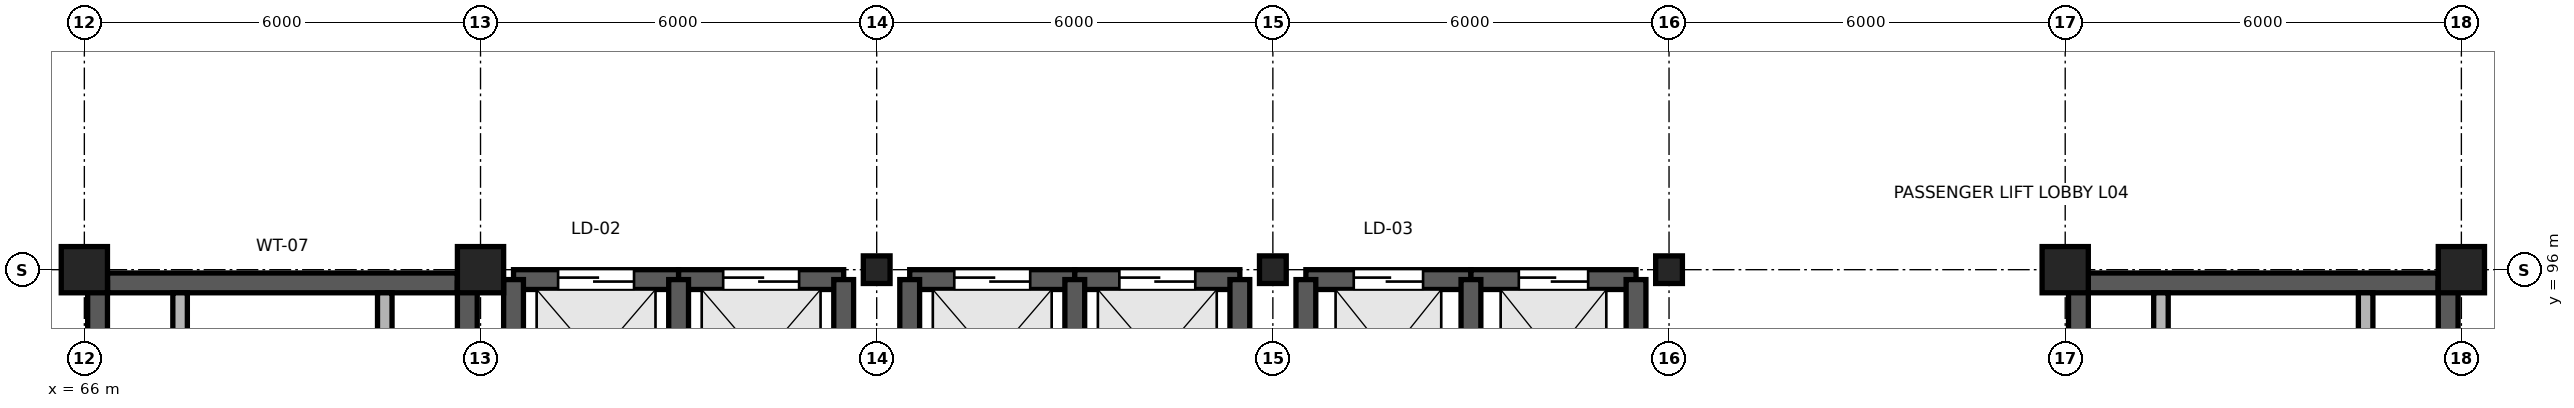
"""IFC4 building model, lengths in metres.
Left out: names, types, materials, properties, quantities, classifications, styles, units other than length and angle.
Written with IfcOpenShell. Run it as: python <this file> out.ifc"""

import sys

from ifc_helpers import new_model, si_unit, direction, frame, frame_2d, origin, origin_2d, place, context, subcontext, project, spatial, rectangle, i_section, extrude, element, fill, save


model = new_model("IFC4")
c1 = context("Model", 3, precision=1e-05, world=origin(), true_north=direction((0.0, 1.0)))
c2 = subcontext(c1, "Body", "Model", "MODEL_VIEW")
j1 = project(units=[si_unit("LENGTHUNIT", "METRE"), si_unit("PLANEANGLEUNIT", "RADIAN")], contexts=[c1])
p1 = place(None, origin())
s1 = spatial("IfcSite", under=j1, at=p1, CompositionType="ELEMENT")
p2 = place(p1, origin())
s2 = spatial("IfcBuilding", under=s1, at=p2, CompositionType="ELEMENT")
p3 = place(p2, frame((0.0, 0.0, 16.5)))
s3 = spatial("IfcBuildingStorey", under=s2, at=p3, CompositionType="ELEMENT", Elevation=16.5)
for number, where, z_axis, x_axis in (
    (1, (66.0, 96.0, 0.0), (0.0, 0.0, 1.0), (1.0, 0.0, 0.0)),
    (2, (72.0, 96.0, 0.0), (0.0, 0.0, 1.0), (1.0, 0.0, 0.0)),
):
    element("IfcColumn", number, at=place(p3, frame(where, z_axis=z_axis, x_axis=x_axis)), inside=s3, PredefinedType="COLUMN", context=c2, shape_type="SweptSolid", body=[
        extrude(rectangle(XDim=0.7, YDim=0.7, at=origin_2d()), origin(), (0.0, 0.0, 1.0), 4.5),
    ])
for number, where, z_axis, x_axis in (
    (3, (78.0, 96.0, 0.0), (0.0, 0.0, 1.0), (1.0, 0.0, 0.0)),
    (4, (84.0, 96.0, 0.0), (0.0, 0.0, 1.0), (1.0, 0.0, 0.0)),
    (5, (90.0, 96.0, 0.0), (0.0, 0.0, 1.0), (1.0, 0.0, 0.0)),
):
    element("IfcColumn", number, at=place(p3, frame(where, z_axis=z_axis, x_axis=x_axis)), inside=s3, PredefinedType="COLUMN", context=c2, shape_type="SweptSolid", body=[
        extrude(i_section(OverallWidth=0.405, OverallDepth=0.418, WebThickness=0.02, FlangeThickness=0.03, FilletRadius=0.022, at=origin_2d()), origin(), (0.0, 0.0, 1.0), 4.5),
    ])
for number, where, z_axis, x_axis in (
    (6, (96.0, 96.0, 0.0), (0.0, 0.0, 1.0), (1.0, 0.0, 0.0)),
    (7, (102.0, 96.0, 0.0), (0.0, 0.0, 1.0), (1.0, 0.0, 0.0)),
):
    element("IfcColumn", number, at=place(p3, frame(where, z_axis=z_axis, x_axis=x_axis)), inside=s3, PredefinedType="COLUMN", context=c2, shape_type="SweptSolid", body=[
        extrude(rectangle(XDim=0.7, YDim=0.7, at=origin_2d()), origin(), (0.0, 0.0, 1.0), 4.5),
    ])
p4 = place(p3, frame((66.35, 95.8, 0.0), z_axis=(0.0, 0.0, 1.0), x_axis=(1.0, 0.0, 0.0)))
e8 = element("IfcWall", 8, at=p4, inside=s3, PredefinedType="SHEAR", context=c2, shape_type="SweptSolid", body=[
    extrude(rectangle(XDim=5.3, YDim=0.3, at=frame_2d((2.65, 0.0))), origin(), (0.0, 0.0, 1.0), 4.34),
])
for number, where, z_axis, x_axis in (
    (9, (66.2, 84.0, 0.0), (0.0, 0.0, 1.0), (0.0, 1.0, 0.0)),
    (10, (71.8, 84.0, 0.0), (0.0, 0.0, 1.0), (0.0, 1.0, 0.0)),
):
    element("IfcWall", number, at=place(p3, frame(where, z_axis=z_axis, x_axis=x_axis)), inside=s3, PredefinedType="SHEAR", context=c2, shape_type="SweptSolid", body=[
        extrude(rectangle(XDim=11.8, YDim=0.3, at=frame_2d((5.9, 0.0))), origin(), (0.0, 0.0, 1.0), 4.34),
    ])
for number, where, z_axis, x_axis in (
    (11, (67.45, 94.4, 0.0), (0.0, 0.0, 1.0), (0.0, 1.0, 0.0)),
    (12, (70.55, 94.4, 0.0), (0.0, 0.0, 1.0), (0.0, 1.0, 0.0)),
):
    element("IfcWall", number, at=place(p3, frame(where, z_axis=z_axis, x_axis=x_axis)), inside=s3, PredefinedType="PARTITIONING", context=c2, shape_type="SweptSolid", body=[
        extrude(rectangle(XDim=1.25, YDim=0.22, at=frame_2d((0.625, 0.0))), origin(), (0.0, 0.0, 1.0), 4.34),
    ])
p5 = place(p3, frame((96.35, 95.8, 0.0), z_axis=(0.0, 0.0, 1.0), x_axis=(1.0, 0.0, 0.0)))
e13 = element("IfcWall", 13, at=p5, inside=s3, PredefinedType="SHEAR", context=c2, shape_type="SweptSolid", body=[
    extrude(rectangle(XDim=5.3, YDim=0.3, at=frame_2d((2.65, 0.0))), origin(), (0.0, 0.0, 1.0), 4.34),
])
for number, where, z_axis, x_axis in (
    (14, (96.2, 84.0, 0.0), (0.0, 0.0, 1.0), (0.0, 1.0, 0.0)),
    (15, (101.8, 84.0, 0.0), (0.0, 0.0, 1.0), (0.0, 1.0, 0.0)),
):
    element("IfcWall", number, at=place(p3, frame(where, z_axis=z_axis, x_axis=x_axis)), inside=s3, PredefinedType="SHEAR", context=c2, shape_type="SweptSolid", body=[
        extrude(rectangle(XDim=11.8, YDim=0.3, at=frame_2d((5.9, 0.0))), origin(), (0.0, 0.0, 1.0), 4.34),
    ])
for number, where, z_axis, x_axis in (
    (16, (97.45, 94.4, 0.0), (0.0, 0.0, 1.0), (0.0, 1.0, 0.0)),
    (17, (100.55, 94.4, 0.0), (0.0, 0.0, 1.0), (0.0, 1.0, 0.0)),
):
    element("IfcWall", number, at=place(p3, frame(where, z_axis=z_axis, x_axis=x_axis)), inside=s3, PredefinedType="PARTITIONING", context=c2, shape_type="SweptSolid", body=[
        extrude(rectangle(XDim=1.25, YDim=0.22, at=frame_2d((0.625, 0.0))), origin(), (0.0, 0.0, 1.0), 4.34),
    ])
p6 = place(p3, frame((72.5, 95.85, 0.0), z_axis=(0.0, 0.0, 1.0), x_axis=(1.0, 0.0, 0.0)))
e18 = element("IfcWall", 18, at=p6, inside=s3, PredefinedType="SHEAR", context=c2, shape_type="SweptSolid", body=[
    extrude(rectangle(XDim=2.5, YDim=0.3, at=frame_2d((1.25, 0.0))), origin(), (0.0, 0.0, 1.0), 4.34),
])
p7 = place(p6, frame((0.675, 0.0, 0.0)))
e19 = element("IfcOpeningElement", 19, at=p7, cuts=e18, PredefinedType="OPENING", context=c2, shape_type="SweptSolid", body=[
    extrude(rectangle(XDim=1.15, YDim=2.15, at=frame_2d((0.575, 1.075))), frame((0.0, 0.165, 0.0), z_axis=(0.0, -1.0, 0.0), x_axis=(1.0, 0.0, 0.0)), (0.0, 0.0, 1.0), 0.33),
])
p8 = place(p3, frame((72.5, 92.45, 0.0), z_axis=(0.0, 0.0, 1.0), x_axis=(0.0, 1.0, 0.0)))
e20 = element("IfcWall", 20, at=p8, inside=s3, PredefinedType="SHEAR", context=c2, shape_type="SweptSolid", body=[
    extrude(rectangle(XDim=3.4, YDim=0.3, at=frame_2d((1.7, 0.0))), origin(), (0.0, 0.0, 1.0), 4.34),
])
p9 = place(p3, frame((75.0, 95.85, 0.0), z_axis=(0.0, 0.0, 1.0), x_axis=(1.0, 0.0, 0.0)))
e21 = element("IfcWall", 21, at=p9, inside=s3, PredefinedType="SHEAR", context=c2, shape_type="SweptSolid", body=[
    extrude(rectangle(XDim=2.5, YDim=0.3, at=frame_2d((1.25, 0.0))), origin(), (0.0, 0.0, 1.0), 4.34),
])
p10 = place(p9, frame((0.675, 0.0, 0.0)))
e22 = element("IfcOpeningElement", 22, at=p10, cuts=e21, PredefinedType="OPENING", context=c2, shape_type="SweptSolid", body=[
    extrude(rectangle(XDim=1.15, YDim=2.15, at=frame_2d((0.575, 1.075))), frame((0.0, 0.165, 0.0), z_axis=(0.0, -1.0, 0.0), x_axis=(1.0, 0.0, 0.0)), (0.0, 0.0, 1.0), 0.33),
])
for number, where, z_axis, x_axis in (
    (23, (75.0, 92.45, 0.0), (0.0, 0.0, 1.0), (0.0, 1.0, 0.0)),
    (24, (77.5, 92.45, 0.0), (0.0, 0.0, 1.0), (0.0, 1.0, 0.0)),
):
    element("IfcWall", number, at=place(p3, frame(where, z_axis=z_axis, x_axis=x_axis)), inside=s3, PredefinedType="SHEAR", context=c2, shape_type="SweptSolid", body=[
        extrude(rectangle(XDim=3.4, YDim=0.3, at=frame_2d((1.7, 0.0))), origin(), (0.0, 0.0, 1.0), 4.34),
    ])
p11 = place(p3, frame((78.5, 95.85, 0.0), z_axis=(0.0, 0.0, 1.0), x_axis=(1.0, 0.0, 0.0)))
e25 = element("IfcWall", 25, at=p11, inside=s3, PredefinedType="SHEAR", context=c2, shape_type="SweptSolid", body=[
    extrude(rectangle(XDim=2.5, YDim=0.3, at=frame_2d((1.25, 0.0))), origin(), (0.0, 0.0, 1.0), 4.34),
])
p12 = place(p11, frame((0.675, 0.0, 0.0)))
e26 = element("IfcOpeningElement", 26, at=p12, cuts=e25, PredefinedType="OPENING", context=c2, shape_type="SweptSolid", body=[
    extrude(rectangle(XDim=1.15, YDim=2.15, at=frame_2d((0.575, 1.075))), frame((0.0, 0.165, 0.0), z_axis=(0.0, -1.0, 0.0), x_axis=(1.0, 0.0, 0.0)), (0.0, 0.0, 1.0), 0.33),
])
p13 = place(p3, frame((78.5, 92.45, 0.0), z_axis=(0.0, 0.0, 1.0), x_axis=(0.0, 1.0, 0.0)))
e27 = element("IfcWall", 27, at=p13, inside=s3, PredefinedType="SHEAR", context=c2, shape_type="SweptSolid", body=[
    extrude(rectangle(XDim=3.4, YDim=0.3, at=frame_2d((1.7, 0.0))), origin(), (0.0, 0.0, 1.0), 4.34),
])
p14 = place(p3, frame((81.0, 95.85, 0.0), z_axis=(0.0, 0.0, 1.0), x_axis=(1.0, 0.0, 0.0)))
e28 = element("IfcWall", 28, at=p14, inside=s3, PredefinedType="SHEAR", context=c2, shape_type="SweptSolid", body=[
    extrude(rectangle(XDim=2.5, YDim=0.3, at=frame_2d((1.25, 0.0))), origin(), (0.0, 0.0, 1.0), 4.34),
])
p15 = place(p14, frame((0.675, 0.0, 0.0)))
e29 = element("IfcOpeningElement", 29, at=p15, cuts=e28, PredefinedType="OPENING", context=c2, shape_type="SweptSolid", body=[
    extrude(rectangle(XDim=1.15, YDim=2.15, at=frame_2d((0.575, 1.075))), frame((0.0, 0.165, 0.0), z_axis=(0.0, -1.0, 0.0), x_axis=(1.0, 0.0, 0.0)), (0.0, 0.0, 1.0), 0.33),
])
for number, where, z_axis, x_axis in (
    (30, (81.0, 92.45, 0.0), (0.0, 0.0, 1.0), (0.0, 1.0, 0.0)),
    (31, (83.5, 92.45, 0.0), (0.0, 0.0, 1.0), (0.0, 1.0, 0.0)),
):
    element("IfcWall", number, at=place(p3, frame(where, z_axis=z_axis, x_axis=x_axis)), inside=s3, PredefinedType="SHEAR", context=c2, shape_type="SweptSolid", body=[
        extrude(rectangle(XDim=3.4, YDim=0.3, at=frame_2d((1.7, 0.0))), origin(), (0.0, 0.0, 1.0), 4.34),
    ])
p16 = place(p3, frame((84.5, 95.85, 0.0), z_axis=(0.0, 0.0, 1.0), x_axis=(1.0, 0.0, 0.0)))
e32 = element("IfcWall", 32, at=p16, inside=s3, PredefinedType="SHEAR", context=c2, shape_type="SweptSolid", body=[
    extrude(rectangle(XDim=2.5, YDim=0.3, at=frame_2d((1.25, 0.0))), origin(), (0.0, 0.0, 1.0), 4.34),
])
p17 = place(p16, frame((0.725, 0.0, 0.0)))
e33 = element("IfcOpeningElement", 33, at=p17, cuts=e32, PredefinedType="OPENING", context=c2, shape_type="SweptSolid", body=[
    extrude(rectangle(XDim=1.05, YDim=2.1, at=frame_2d((0.525, 1.05))), frame((0.0, 0.165, 0.0), z_axis=(0.0, -1.0, 0.0), x_axis=(1.0, 0.0, 0.0)), (0.0, 0.0, 1.0), 0.33),
])
p18 = place(p3, frame((84.5, 92.45, 0.0), z_axis=(0.0, 0.0, 1.0), x_axis=(0.0, 1.0, 0.0)))
e34 = element("IfcWall", 34, at=p18, inside=s3, PredefinedType="SHEAR", context=c2, shape_type="SweptSolid", body=[
    extrude(rectangle(XDim=3.4, YDim=0.3, at=frame_2d((1.7, 0.0))), origin(), (0.0, 0.0, 1.0), 4.34),
])
p19 = place(p3, frame((87.0, 95.85, 0.0), z_axis=(0.0, 0.0, 1.0), x_axis=(1.0, 0.0, 0.0)))
e35 = element("IfcWall", 35, at=p19, inside=s3, PredefinedType="SHEAR", context=c2, shape_type="SweptSolid", body=[
    extrude(rectangle(XDim=2.5, YDim=0.3, at=frame_2d((1.25, 0.0))), origin(), (0.0, 0.0, 1.0), 4.34),
])
p20 = place(p19, frame((0.725, 0.0, 0.0)))
e36 = element("IfcOpeningElement", 36, at=p20, cuts=e35, PredefinedType="OPENING", context=c2, shape_type="SweptSolid", body=[
    extrude(rectangle(XDim=1.05, YDim=2.1, at=frame_2d((0.525, 1.05))), frame((0.0, 0.165, 0.0), z_axis=(0.0, -1.0, 0.0), x_axis=(1.0, 0.0, 0.0)), (0.0, 0.0, 1.0), 0.33),
])
for number, where, z_axis, x_axis in (
    (37, (87.0, 92.45, 0.0), (0.0, 0.0, 1.0), (0.0, 1.0, 0.0)),
    (38, (89.5, 92.45, 0.0), (0.0, 0.0, 1.0), (0.0, 1.0, 0.0)),
):
    element("IfcWall", number, at=place(p3, frame(where, z_axis=z_axis, x_axis=x_axis)), inside=s3, PredefinedType="SHEAR", context=c2, shape_type="SweptSolid", body=[
        extrude(rectangle(XDim=3.4, YDim=0.3, at=frame_2d((1.7, 0.0))), origin(), (0.0, 0.0, 1.0), 4.34),
    ])
p21 = place(p7, origin())
e39 = element("IfcDoor", 39, at=p21, inside=s3, OperationType="DOUBLE_DOOR_SLIDING", PredefinedType="DOOR", context=c2, shape_type="SweptSolid", body=[
    extrude(rectangle(XDim=1.15, YDim=2.15, at=frame_2d((0.575, 1.075))), frame((0.0, 0.025, 0.0), z_axis=(0.0, -1.0, 0.0), x_axis=(1.0, 0.0, 0.0)), (0.0, 0.0, 1.0), 0.05),
])
fill(e19, e39)
p22 = place(p10, origin())
e40 = element("IfcDoor", 40, at=p22, inside=s3, OperationType="DOUBLE_DOOR_SLIDING", PredefinedType="DOOR", context=c2, shape_type="SweptSolid", body=[
    extrude(rectangle(XDim=1.15, YDim=2.15, at=frame_2d((0.575, 1.075))), frame((0.0, 0.025, 0.0), z_axis=(0.0, -1.0, 0.0), x_axis=(1.0, 0.0, 0.0)), (0.0, 0.0, 1.0), 0.05),
])
fill(e22, e40)
p23 = place(p12, origin())
e41 = element("IfcDoor", 41, at=p23, inside=s3, OperationType="DOUBLE_DOOR_SLIDING", PredefinedType="DOOR", context=c2, shape_type="SweptSolid", body=[
    extrude(rectangle(XDim=1.15, YDim=2.15, at=frame_2d((0.575, 1.075))), frame((0.0, 0.025, 0.0), z_axis=(0.0, -1.0, 0.0), x_axis=(1.0, 0.0, 0.0)), (0.0, 0.0, 1.0), 0.05),
])
fill(e26, e41)
p24 = place(p15, origin())
e42 = element("IfcDoor", 42, at=p24, inside=s3, OperationType="DOUBLE_DOOR_SLIDING", PredefinedType="DOOR", context=c2, shape_type="SweptSolid", body=[
    extrude(rectangle(XDim=1.15, YDim=2.15, at=frame_2d((0.575, 1.075))), frame((0.0, 0.025, 0.0), z_axis=(0.0, -1.0, 0.0), x_axis=(1.0, 0.0, 0.0)), (0.0, 0.0, 1.0), 0.05),
])
fill(e29, e42)
p25 = place(p17, origin())
e43 = element("IfcDoor", 43, at=p25, inside=s3, OperationType="DOUBLE_DOOR_SLIDING", PredefinedType="DOOR", context=c2, shape_type="SweptSolid", body=[
    extrude(rectangle(XDim=1.05, YDim=2.1, at=frame_2d((0.525, 1.05))), frame((0.0, 0.025, 0.0), z_axis=(0.0, -1.0, 0.0), x_axis=(1.0, 0.0, 0.0)), (0.0, 0.0, 1.0), 0.05),
])
fill(e33, e43)
p26 = place(p20, origin())
e44 = element("IfcDoor", 44, at=p26, inside=s3, OperationType="DOUBLE_DOOR_SLIDING", PredefinedType="DOOR", context=c2, shape_type="SweptSolid", body=[
    extrude(rectangle(XDim=1.05, YDim=2.1, at=frame_2d((0.525, 1.05))), frame((0.0, 0.025, 0.0), z_axis=(0.0, -1.0, 0.0), x_axis=(1.0, 0.0, 0.0)), (0.0, 0.0, 1.0), 0.05),
])
fill(e36, e44)
save(model, sys.argv[1])
